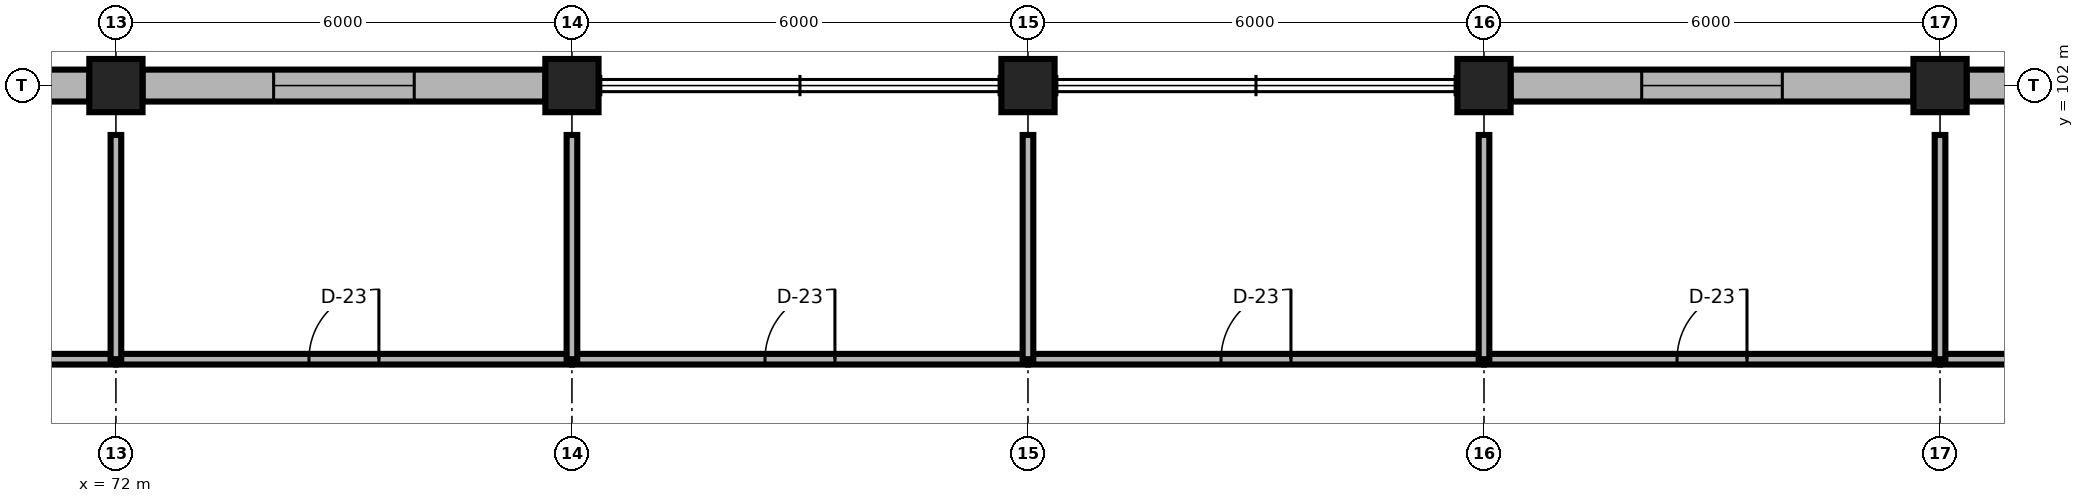
"""IFC4 building model, lengths in metres.
Left out: names, types, materials, properties, quantities, classifications, styles, units other than length and angle.
Written with IfcOpenShell. Run it as: python <this file> out.ifc"""

import sys

from ifc_helpers import new_model, si_unit, direction, frame, frame_2d, origin, origin_2d, place, context, subcontext, project, spatial, rectangle, extrude, element, fill, save


model = new_model("IFC4")
c1 = context("Model", 3, precision=1e-05, world=origin(), true_north=direction((0.0, 1.0)))
c2 = subcontext(c1, "Body", "Model", "MODEL_VIEW")
j1 = project(units=[si_unit("LENGTHUNIT", "METRE"), si_unit("PLANEANGLEUNIT", "RADIAN")], contexts=[c1])
p1 = place(None, origin())
s1 = spatial("IfcSite", under=j1, at=p1, CompositionType="ELEMENT")
p2 = place(p1, origin())
s2 = spatial("IfcBuilding", under=s1, at=p2, CompositionType="ELEMENT")
p3 = place(p2, frame((0.0, 0.0, 48.3)))
s3 = spatial("IfcBuildingStorey", under=s2, at=p3, CompositionType="ELEMENT", Elevation=48.3)
for number, where, z_axis, x_axis in (
    (1, (72.0, 102.0, 0.0), (0.0, 0.0, 1.0), (1.0, 0.0, 0.0)),
    (2, (78.0, 102.0, 0.0), (0.0, 0.0, 1.0), (1.0, 0.0, 0.0)),
    (3, (84.0, 102.0, 0.0), (0.0, 0.0, 1.0), (1.0, 0.0, 0.0)),
    (4, (90.0, 102.0, 0.0), (0.0, 0.0, 1.0), (1.0, 0.0, 0.0)),
    (5, (96.0, 102.0, 0.0), (0.0, 0.0, 1.0), (1.0, 0.0, 0.0)),
):
    element("IfcColumn", number, at=place(p3, frame(where, z_axis=z_axis, x_axis=x_axis)), inside=s3, PredefinedType="COLUMN", context=c2, shape_type="SweptSolid", body=[
        extrude(rectangle(XDim=0.7, YDim=0.7, at=origin_2d()), origin(), (0.0, 0.0, 1.0), 3.9),
    ])
p4 = place(p3, frame((66.35, 102.0, 0.0), z_axis=(0.0, 0.0, 1.0), x_axis=(1.0, 0.0, 0.0)))
e6 = element("IfcWall", 6, at=p4, inside=s3, PredefinedType="SOLIDWALL", context=c2, shape_type="SweptSolid", body=[
    extrude(rectangle(XDim=5.3, YDim=0.42, at=frame_2d((2.65, 0.0))), origin(), (0.0, 0.0, 1.0), 3.26),
])
p5 = place(p4, frame((1.725, 0.0, 0.85)))
e7 = element("IfcOpeningElement", 7, at=p5, cuts=e6, PredefinedType="OPENING", context=c2, shape_type="SweptSolid", body=[
    extrude(rectangle(XDim=1.85, YDim=2.0, at=frame_2d((0.925, 1.0))), frame((0.0, 0.225, 0.0), z_axis=(0.0, -1.0, 0.0), x_axis=(1.0, 0.0, 0.0)), (0.0, 0.0, 1.0), 0.45),
])
p6 = place(p3, frame((72.35, 102.0, 0.0), z_axis=(0.0, 0.0, 1.0), x_axis=(1.0, 0.0, 0.0)))
e8 = element("IfcWall", 8, at=p6, inside=s3, PredefinedType="SOLIDWALL", context=c2, shape_type="SweptSolid", body=[
    extrude(rectangle(XDim=5.3, YDim=0.42, at=frame_2d((2.65, 0.0))), origin(), (0.0, 0.0, 1.0), 3.26),
])
p7 = place(p6, frame((1.725, 0.0, 0.85)))
e9 = element("IfcOpeningElement", 9, at=p7, cuts=e8, PredefinedType="OPENING", context=c2, shape_type="SweptSolid", body=[
    extrude(rectangle(XDim=1.85, YDim=2.0, at=frame_2d((0.925, 1.0))), frame((0.0, 0.225, 0.0), z_axis=(0.0, -1.0, 0.0), x_axis=(1.0, 0.0, 0.0)), (0.0, 0.0, 1.0), 0.45),
])
p8 = place(p3, frame((90.35, 102.0, 0.0), z_axis=(0.0, 0.0, 1.0), x_axis=(1.0, 0.0, 0.0)))
e10 = element("IfcWall", 10, at=p8, inside=s3, PredefinedType="SOLIDWALL", context=c2, shape_type="SweptSolid", body=[
    extrude(rectangle(XDim=5.3, YDim=0.42, at=frame_2d((2.65, 0.0))), origin(), (0.0, 0.0, 1.0), 3.26),
])
p9 = place(p8, frame((1.725, 0.0, 0.85)))
e11 = element("IfcOpeningElement", 11, at=p9, cuts=e10, PredefinedType="OPENING", context=c2, shape_type="SweptSolid", body=[
    extrude(rectangle(XDim=1.85, YDim=2.0, at=frame_2d((0.925, 1.0))), frame((0.0, 0.225, 0.0), z_axis=(0.0, -1.0, 0.0), x_axis=(1.0, 0.0, 0.0)), (0.0, 0.0, 1.0), 0.45),
])
p10 = place(p3, frame((96.35, 102.0, 0.0), z_axis=(0.0, 0.0, 1.0), x_axis=(1.0, 0.0, 0.0)))
e12 = element("IfcWall", 12, at=p10, inside=s3, PredefinedType="SOLIDWALL", context=c2, shape_type="SweptSolid", body=[
    extrude(rectangle(XDim=5.3, YDim=0.42, at=frame_2d((2.65, 0.0))), origin(), (0.0, 0.0, 1.0), 3.26),
])
p11 = place(p10, frame((1.725, 0.0, 0.85)))
e13 = element("IfcOpeningElement", 13, at=p11, cuts=e12, PredefinedType="OPENING", context=c2, shape_type="SweptSolid", body=[
    extrude(rectangle(XDim=1.85, YDim=2.0, at=frame_2d((0.925, 1.0))), frame((0.0, 0.225, 0.0), z_axis=(0.0, -1.0, 0.0), x_axis=(1.0, 0.0, 0.0)), (0.0, 0.0, 1.0), 0.45),
])
p12 = place(p3, frame((66.0, 98.4, 0.0), z_axis=(0.0, 0.0, 1.0), x_axis=(1.0, 0.0, 0.0)))
e14 = element("IfcWall", 14, at=p12, inside=s3, PredefinedType="PARTITIONING", context=c2, shape_type="SweptSolid", body=[
    extrude(rectangle(XDim=6.0, YDim=0.14, at=frame_2d((3.0, 0.0))), origin(), (0.0, 0.0, 1.0), 3.68),
])
p13 = place(p12, frame((2.54, 0.0, 0.0)))
e15 = element("IfcOpeningElement", 15, at=p13, cuts=e14, PredefinedType="OPENING", context=c2, shape_type="SweptSolid", body=[
    extrude(rectangle(XDim=0.92, YDim=2.15, at=frame_2d((0.46, 1.075))), frame((0.0, 0.085, 0.0), z_axis=(0.0, -1.0, 0.0), x_axis=(1.0, 0.0, 0.0)), (0.0, 0.0, 1.0), 0.17),
])
p14 = place(p3, frame((72.0, 98.4, 0.0), z_axis=(0.0, 0.0, 1.0), x_axis=(1.0, 0.0, 0.0)))
e16 = element("IfcWall", 16, at=p14, inside=s3, PredefinedType="PARTITIONING", context=c2, shape_type="SweptSolid", body=[
    extrude(rectangle(XDim=6.0, YDim=0.14, at=frame_2d((3.0, 0.0))), origin(), (0.0, 0.0, 1.0), 3.68),
])
p15 = place(p14, frame((2.54, 0.0, 0.0)))
e17 = element("IfcOpeningElement", 17, at=p15, cuts=e16, PredefinedType="OPENING", context=c2, shape_type="SweptSolid", body=[
    extrude(rectangle(XDim=0.92, YDim=2.15, at=frame_2d((0.46, 1.075))), frame((0.0, 0.085, 0.0), z_axis=(0.0, -1.0, 0.0), x_axis=(1.0, 0.0, 0.0)), (0.0, 0.0, 1.0), 0.17),
])
p16 = place(p3, frame((78.0, 98.4, 0.0), z_axis=(0.0, 0.0, 1.0), x_axis=(1.0, 0.0, 0.0)))
e18 = element("IfcWall", 18, at=p16, inside=s3, PredefinedType="PARTITIONING", context=c2, shape_type="SweptSolid", body=[
    extrude(rectangle(XDim=6.0, YDim=0.14, at=frame_2d((3.0, 0.0))), origin(), (0.0, 0.0, 1.0), 3.68),
])
p17 = place(p16, frame((2.54, 0.0, 0.0)))
e19 = element("IfcOpeningElement", 19, at=p17, cuts=e18, PredefinedType="OPENING", context=c2, shape_type="SweptSolid", body=[
    extrude(rectangle(XDim=0.92, YDim=2.15, at=frame_2d((0.46, 1.075))), frame((0.0, 0.085, 0.0), z_axis=(0.0, -1.0, 0.0), x_axis=(1.0, 0.0, 0.0)), (0.0, 0.0, 1.0), 0.17),
])
p18 = place(p3, frame((84.0, 98.4, 0.0), z_axis=(0.0, 0.0, 1.0), x_axis=(1.0, 0.0, 0.0)))
e20 = element("IfcWall", 20, at=p18, inside=s3, PredefinedType="PARTITIONING", context=c2, shape_type="SweptSolid", body=[
    extrude(rectangle(XDim=6.0, YDim=0.14, at=frame_2d((3.0, 0.0))), origin(), (0.0, 0.0, 1.0), 3.68),
])
p19 = place(p18, frame((2.54, 0.0, 0.0)))
e21 = element("IfcOpeningElement", 21, at=p19, cuts=e20, PredefinedType="OPENING", context=c2, shape_type="SweptSolid", body=[
    extrude(rectangle(XDim=0.92, YDim=2.15, at=frame_2d((0.46, 1.075))), frame((0.0, 0.085, 0.0), z_axis=(0.0, -1.0, 0.0), x_axis=(1.0, 0.0, 0.0)), (0.0, 0.0, 1.0), 0.17),
])
p20 = place(p3, frame((90.0, 98.4, 0.0), z_axis=(0.0, 0.0, 1.0), x_axis=(1.0, 0.0, 0.0)))
e22 = element("IfcWall", 22, at=p20, inside=s3, PredefinedType="PARTITIONING", context=c2, shape_type="SweptSolid", body=[
    extrude(rectangle(XDim=6.0, YDim=0.14, at=frame_2d((3.0, 0.0))), origin(), (0.0, 0.0, 1.0), 3.68),
])
p21 = place(p20, frame((2.54, 0.0, 0.0)))
e23 = element("IfcOpeningElement", 23, at=p21, cuts=e22, PredefinedType="OPENING", context=c2, shape_type="SweptSolid", body=[
    extrude(rectangle(XDim=0.92, YDim=2.15, at=frame_2d((0.46, 1.075))), frame((0.0, 0.085, 0.0), z_axis=(0.0, -1.0, 0.0), x_axis=(1.0, 0.0, 0.0)), (0.0, 0.0, 1.0), 0.17),
])
p22 = place(p3, frame((96.0, 98.4, 0.0), z_axis=(0.0, 0.0, 1.0), x_axis=(1.0, 0.0, 0.0)))
e24 = element("IfcWall", 24, at=p22, inside=s3, PredefinedType="PARTITIONING", context=c2, shape_type="SweptSolid", body=[
    extrude(rectangle(XDim=6.0, YDim=0.14, at=frame_2d((3.0, 0.0))), origin(), (0.0, 0.0, 1.0), 3.68),
])
p23 = place(p22, frame((2.54, 0.0, 0.0)))
e25 = element("IfcOpeningElement", 25, at=p23, cuts=e24, PredefinedType="OPENING", context=c2, shape_type="SweptSolid", body=[
    extrude(rectangle(XDim=0.92, YDim=2.15, at=frame_2d((0.46, 1.075))), frame((0.0, 0.085, 0.0), z_axis=(0.0, -1.0, 0.0), x_axis=(1.0, 0.0, 0.0)), (0.0, 0.0, 1.0), 0.17),
])
for number, where, z_axis, x_axis in (
    (26, (72.0, 98.4, 0.0), (0.0, 0.0, 1.0), (0.0, 1.0, 0.0)),
    (27, (78.0, 98.4, 0.0), (0.0, 0.0, 1.0), (0.0, 1.0, 0.0)),
    (28, (84.0, 98.4, 0.0), (0.0, 0.0, 1.0), (0.0, 1.0, 0.0)),
    (29, (90.0, 98.4, 0.0), (0.0, 0.0, 1.0), (0.0, 1.0, 0.0)),
    (30, (96.0, 98.4, 0.0), (0.0, 0.0, 1.0), (0.0, 1.0, 0.0)),
):
    element("IfcWall", number, at=place(p3, frame(where, z_axis=z_axis, x_axis=x_axis)), inside=s3, PredefinedType="PARTITIONING", context=c2, shape_type="SweptSolid", body=[
        extrude(rectangle(XDim=2.95, YDim=0.14, at=frame_2d((1.475, 0.0))), origin(), (0.0, 0.0, 1.0), 3.288),
    ])
p24 = place(p7, origin())
e31 = element("IfcWindow", 31, at=p24, inside=s3, PartitioningType="SINGLE_PANEL", PredefinedType="WINDOW", context=c2, shape_type="SweptSolid", body=[
    extrude(rectangle(XDim=1.85, YDim=2.0, at=frame_2d((0.925, 1.0))), frame((0.0, 0.03, 0.0), z_axis=(0.0, -1.0, 0.0), x_axis=(1.0, 0.0, 0.0)), (0.0, 0.0, 1.0), 0.06),
])
fill(e9, e31)
p25 = place(p9, origin())
e32 = element("IfcWindow", 32, at=p25, inside=s3, PartitioningType="SINGLE_PANEL", PredefinedType="WINDOW", context=c2, shape_type="SweptSolid", body=[
    extrude(rectangle(XDim=1.85, YDim=2.0, at=frame_2d((0.925, 1.0))), frame((0.0, 0.03, 0.0), z_axis=(0.0, -1.0, 0.0), x_axis=(1.0, 0.0, 0.0)), (0.0, 0.0, 1.0), 0.06),
])
fill(e11, e32)
p26 = place(p15, origin())
e33 = element("IfcDoor", 33, at=p26, inside=s3, OperationType="SINGLE_SWING_RIGHT", PredefinedType="DOOR", context=c2, shape_type="SweptSolid", body=[
    extrude(rectangle(XDim=0.92, YDim=2.15, at=frame_2d((0.46, 1.075))), frame((0.0, 0.025, 0.0), z_axis=(0.0, -1.0, 0.0), x_axis=(1.0, 0.0, 0.0)), (0.0, 0.0, 1.0), 0.05),
])
fill(e17, e33)
p27 = place(p17, origin())
e34 = element("IfcDoor", 34, at=p27, inside=s3, OperationType="SINGLE_SWING_RIGHT", PredefinedType="DOOR", context=c2, shape_type="SweptSolid", body=[
    extrude(rectangle(XDim=0.92, YDim=2.15, at=frame_2d((0.46, 1.075))), frame((0.0, 0.025, 0.0), z_axis=(0.0, -1.0, 0.0), x_axis=(1.0, 0.0, 0.0)), (0.0, 0.0, 1.0), 0.05),
])
fill(e19, e34)
p28 = place(p19, origin())
e35 = element("IfcDoor", 35, at=p28, inside=s3, OperationType="SINGLE_SWING_RIGHT", PredefinedType="DOOR", context=c2, shape_type="SweptSolid", body=[
    extrude(rectangle(XDim=0.92, YDim=2.15, at=frame_2d((0.46, 1.075))), frame((0.0, 0.025, 0.0), z_axis=(0.0, -1.0, 0.0), x_axis=(1.0, 0.0, 0.0)), (0.0, 0.0, 1.0), 0.05),
])
fill(e21, e35)
p29 = place(p21, origin())
e36 = element("IfcDoor", 36, at=p29, inside=s3, OperationType="SINGLE_SWING_RIGHT", PredefinedType="DOOR", context=c2, shape_type="SweptSolid", body=[
    extrude(rectangle(XDim=0.92, YDim=2.15, at=frame_2d((0.46, 1.075))), frame((0.0, 0.025, 0.0), z_axis=(0.0, -1.0, 0.0), x_axis=(1.0, 0.0, 0.0)), (0.0, 0.0, 1.0), 0.05),
])
fill(e23, e36)
save(model, sys.argv[1])
